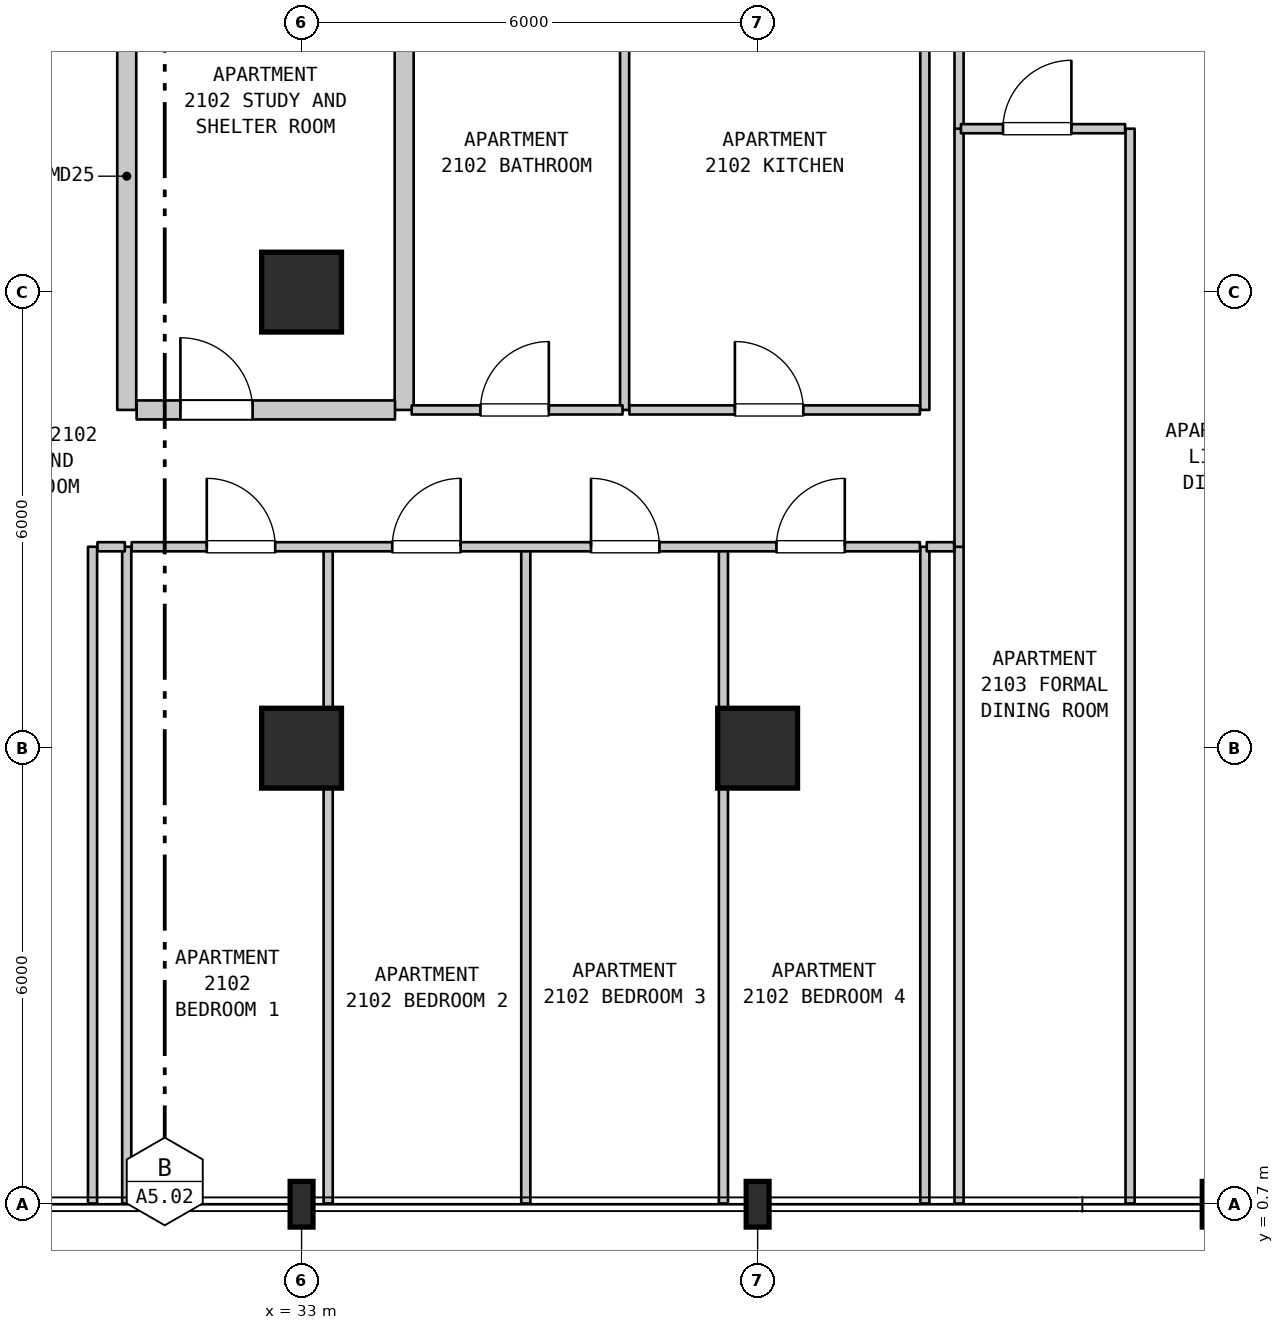
"""IFC4 building model, lengths in metres.
Left out: names, types, materials, properties, quantities, classifications, styles, units other than length and angle.
Written with IfcOpenShell. Run it as: python <this file> out.ifc"""

import sys

from ifc_helpers import new_model, si_unit, direction, frame, frame_2d, origin, origin_2d, place, context, subcontext, project, spatial, rectangle, i_section, extrude, element, fill, save


model = new_model("IFC4")
c1 = context("Model", 3, precision=1e-05, world=origin(), true_north=direction((0.0, 1.0)))
c2 = subcontext(c1, "Body", "Model", "MODEL_VIEW")
j1 = project(units=[si_unit("LENGTHUNIT", "METRE"), si_unit("PLANEANGLEUNIT", "RADIAN")], contexts=[c1])
p1 = place(None, origin())
s1 = spatial("IfcSite", under=j1, at=p1, CompositionType="ELEMENT")
p2 = place(p1, origin())
s2 = spatial("IfcBuilding", under=s1, at=p2, CompositionType="ELEMENT")
p3 = place(p2, frame((0.0, 0.0, 90.9)))
s3 = spatial("IfcBuildingStorey", under=s2, at=p3, CompositionType="ELEMENT", Elevation=90.9)
p4 = place(p3, frame((33.0, 0.7, 0.0), z_axis=(0.0, 0.0, 1.0), x_axis=(1.0, 0.0, 0.0)))
e1 = element("IfcColumn", 1, at=p4, inside=s3, PredefinedType="COLUMN", context=c2, shape_type="SweptSolid", body=[
    extrude(i_section(OverallWidth=0.3, OverallDepth=0.6, WebThickness=0.015, FlangeThickness=0.03, FilletRadius=0.027, at=origin_2d()), origin(), (0.0, 0.0, 1.0), 3.7),
])
for number, where, z_axis, x_axis in (
    (2, (33.0, 6.7, 0.0), (0.0, 0.0, 1.0), (1.0, 0.0, 0.0)),
    (3, (33.0, 12.7, 0.0), (0.0, 0.0, 1.0), (1.0, 0.0, 0.0)),
):
    element("IfcColumn", number, at=place(p3, frame(where, z_axis=z_axis, x_axis=x_axis)), inside=s3, PredefinedType="COLUMN", context=c2, shape_type="SweptSolid", body=[
        extrude(rectangle(XDim=1.05, YDim=1.05, at=origin_2d()), origin(), (0.0, 0.0, 1.0), 3.7),
    ])
p5 = place(p3, frame((39.0, 0.7, 0.0), z_axis=(0.0, 0.0, 1.0), x_axis=(1.0, 0.0, 0.0)))
e4 = element("IfcColumn", 4, at=p5, inside=s3, PredefinedType="COLUMN", context=c2, shape_type="SweptSolid", body=[
    extrude(i_section(OverallWidth=0.3, OverallDepth=0.6, WebThickness=0.015, FlangeThickness=0.03, FilletRadius=0.027, at=origin_2d()), origin(), (0.0, 0.0, 1.0), 3.7),
])
p6 = place(p3, frame((39.0, 6.7, 0.0), z_axis=(0.0, 0.0, 1.0), x_axis=(1.0, 0.0, 0.0)))
e5 = element("IfcColumn", 5, at=p6, inside=s3, PredefinedType="COLUMN", context=c2, shape_type="SweptSolid", body=[
    extrude(rectangle(XDim=1.05, YDim=1.05, at=origin_2d()), origin(), (0.0, 0.0, 1.0), 3.7),
])
p7 = place(p3, frame((45.0, 0.7, 0.0), z_axis=(0.0, 0.0, 1.0), x_axis=(1.0, 0.0, 0.0)))
e6 = element("IfcColumn", 6, at=p7, inside=s3, PredefinedType="COLUMN", context=c2, shape_type="SweptSolid", body=[
    extrude(i_section(OverallWidth=0.3, OverallDepth=0.6, WebThickness=0.015, FlangeThickness=0.03, FilletRadius=0.027, at=origin_2d()), origin(), (0.0, 0.0, 1.0), 3.7),
])
for number, where, z_axis, x_axis in (
    (7, (30.25, 0.71, 0.0), (0.0, 0.0, 1.0), (0.0, 1.0, 0.0)),
    (8, (30.7, 0.71, 0.0), (0.0, 0.0, 1.0), (0.0, 1.0, 0.0)),
):
    element("IfcWall", number, at=place(p3, frame(where, z_axis=z_axis, x_axis=x_axis)), inside=s3, PredefinedType="PARTITIONING", context=c2, shape_type="SweptSolid", body=[
        extrude(rectangle(XDim=8.64, YDim=0.12, at=frame_2d((4.32, 0.0))), origin(), (0.0, 0.0, 1.0), 3.385),
    ])
p8 = place(p3, frame((30.7, 11.15, 0.0), z_axis=(0.0, 0.0, 1.0), x_axis=(0.0, 1.0, 0.0)))
e9 = element("IfcWall", 9, at=p8, inside=s3, PredefinedType="STANDARD", context=c2, shape_type="SweptSolid", body=[
    extrude(rectangle(XDim=6.15, YDim=0.25, at=frame_2d((3.075, 0.0))), origin(), (0.0, 0.0, 1.0), 3.385),
])
p9 = place(p3, frame((33.35, 0.71, 0.0), z_axis=(0.0, 0.0, 1.0), x_axis=(0.0, 1.0, 0.0)))
e10 = element("IfcWall", 10, at=p9, inside=s3, PredefinedType="PARTITIONING", context=c2, shape_type="SweptSolid", body=[
    extrude(rectangle(XDim=8.64, YDim=0.12, at=frame_2d((4.32, 0.0))), origin(), (0.0, 0.0, 1.0), 3.385),
])
p10 = place(p3, frame((34.35, 11.15, 0.0), z_axis=(0.0, 0.0, 1.0), x_axis=(0.0, 1.0, 0.0)))
e11 = element("IfcWall", 11, at=p10, inside=s3, PredefinedType="STANDARD", context=c2, shape_type="SweptSolid", body=[
    extrude(rectangle(XDim=6.15, YDim=0.25, at=frame_2d((3.075, 0.0))), origin(), (0.0, 0.0, 1.0), 3.385),
])
p11 = place(p3, frame((35.95, 0.71, 0.0), z_axis=(0.0, 0.0, 1.0), x_axis=(0.0, 1.0, 0.0)))
e12 = element("IfcWall", 12, at=p11, inside=s3, PredefinedType="PARTITIONING", context=c2, shape_type="SweptSolid", body=[
    extrude(rectangle(XDim=8.64, YDim=0.12, at=frame_2d((4.32, 0.0))), origin(), (0.0, 0.0, 1.0), 3.385),
])
p12 = place(p3, frame((37.25, 11.15, 0.0), z_axis=(0.0, 0.0, 1.0), x_axis=(0.0, 1.0, 0.0)))
e13 = element("IfcWall", 13, at=p12, inside=s3, PredefinedType="PARTITIONING", context=c2, shape_type="SweptSolid", body=[
    extrude(rectangle(XDim=6.15, YDim=0.12, at=frame_2d((3.075, 0.0))), origin(), (0.0, 0.0, 1.0), 3.385),
])
for number, where, z_axis, x_axis in (
    (14, (38.55, 0.71, 0.0), (0.0, 0.0, 1.0), (0.0, 1.0, 0.0)),
    (15, (41.2, 0.71, 0.0), (0.0, 0.0, 1.0), (0.0, 1.0, 0.0)),
):
    element("IfcWall", number, at=place(p3, frame(where, z_axis=z_axis, x_axis=x_axis)), inside=s3, PredefinedType="PARTITIONING", context=c2, shape_type="SweptSolid", body=[
        extrude(rectangle(XDim=8.64, YDim=0.12, at=frame_2d((4.32, 0.0))), origin(), (0.0, 0.0, 1.0), 3.385),
    ])
p13 = place(p3, frame((41.2, 11.15, 0.0), z_axis=(0.0, 0.0, 1.0), x_axis=(0.0, 1.0, 0.0)))
e16 = element("IfcWall", 16, at=p13, inside=s3, PredefinedType="PARTITIONING", context=c2, shape_type="SweptSolid", body=[
    extrude(rectangle(XDim=6.15, YDim=0.12, at=frame_2d((3.075, 0.0))), origin(), (0.0, 0.0, 1.0), 3.385),
])
p14 = place(p3, frame((41.65, 0.71, 0.0), z_axis=(0.0, 0.0, 1.0), x_axis=(0.0, 1.0, 0.0)))
e17 = element("IfcWall", 17, at=p14, inside=s3, PredefinedType="PARTITIONING", context=c2, shape_type="SweptSolid", body=[
    extrude(rectangle(XDim=8.64, YDim=0.12, at=frame_2d((4.32, 0.0))), origin(), (0.0, 0.0, 1.0), 3.385),
])
p15 = place(p3, frame((41.65, 9.35, 0.0), z_axis=(0.0, 0.0, 1.0), x_axis=(0.0, 1.0, 0.0)))
e18 = element("IfcWall", 18, at=p15, inside=s3, PredefinedType="PARTITIONING", context=c2, shape_type="SweptSolid", body=[
    extrude(rectangle(XDim=5.5, YDim=0.12, at=frame_2d((2.75, 0.0))), origin(), (0.0, 0.0, 1.0), 3.385),
])
p16 = place(p3, frame((41.65, 14.85, 0.0), z_axis=(0.0, 0.0, 1.0), x_axis=(0.0, 1.0, 0.0)))
e19 = element("IfcWall", 19, at=p16, inside=s3, PredefinedType="PARTITIONING", context=c2, shape_type="SweptSolid", body=[
    extrude(rectangle(XDim=2.45, YDim=0.12, at=frame_2d((1.225, 0.0))), origin(), (0.0, 0.0, 1.0), 3.385),
])
p17 = place(p3, frame((43.9, 0.71, 0.0), z_axis=(0.0, 0.0, 1.0), x_axis=(0.0, 1.0, 0.0)))
e20 = element("IfcWall", 20, at=p17, inside=s3, PredefinedType="PARTITIONING", context=c2, shape_type="SweptSolid", body=[
    extrude(rectangle(XDim=14.14, YDim=0.12, at=frame_2d((7.07, 0.0))), origin(), (0.0, 0.0, 1.0), 3.385),
])
p18 = place(p3, frame((30.315, 9.35, 0.0), z_axis=(0.0, 0.0, 1.0), x_axis=(1.0, 0.0, 0.0)))
e21 = element("IfcWall", 21, at=p18, inside=s3, PredefinedType="PARTITIONING", context=c2, shape_type="SweptSolid", body=[
    extrude(rectangle(XDim=0.36, YDim=0.12, at=frame_2d((0.18, 0.0))), origin(), (0.0, 0.0, 1.0), 3.385),
])
p19 = place(p3, frame((30.765, 9.35, 0.0), z_axis=(0.0, 0.0, 1.0), x_axis=(1.0, 0.0, 0.0)))
e22 = element("IfcWall", 22, at=p19, inside=s3, PredefinedType="PARTITIONING", context=c2, shape_type="SweptSolid", body=[
    extrude(rectangle(XDim=10.37, YDim=0.12, at=frame_2d((5.185, 0.0))), origin(), (0.0, 0.0, 1.0), 3.385),
])
p20 = place(p19, frame((0.988, 0.0, 0.0)))
e23 = element("IfcOpeningElement", 23, at=p20, cuts=e22, PredefinedType="OPENING", context=c2, shape_type="SweptSolid", body=[
    extrude(rectangle(XDim=0.9, YDim=2.15, at=frame_2d((0.45, 1.075))), frame((0.0, 0.07, 0.0), z_axis=(0.0, -1.0, 0.0), x_axis=(1.0, 0.0, 0.0)), (0.0, 0.0, 1.0), 0.14),
])
p21 = place(p19, frame((3.428, 0.0, 0.0)))
e24 = element("IfcOpeningElement", 24, at=p21, cuts=e22, PredefinedType="OPENING", context=c2, shape_type="SweptSolid", body=[
    extrude(rectangle(XDim=0.9, YDim=2.15, at=frame_2d((0.45, 1.075))), frame((0.0, 0.07, 0.0), z_axis=(0.0, -1.0, 0.0), x_axis=(1.0, 0.0, 0.0)), (0.0, 0.0, 1.0), 0.14),
])
p22 = place(p19, frame((6.043, 0.0, 0.0)))
e25 = element("IfcOpeningElement", 25, at=p22, cuts=e22, PredefinedType="OPENING", context=c2, shape_type="SweptSolid", body=[
    extrude(rectangle(XDim=0.9, YDim=2.15, at=frame_2d((0.45, 1.075))), frame((0.0, 0.07, 0.0), z_axis=(0.0, -1.0, 0.0), x_axis=(1.0, 0.0, 0.0)), (0.0, 0.0, 1.0), 0.14),
])
p23 = place(p19, frame((8.482, 0.0, 0.0)))
e26 = element("IfcOpeningElement", 26, at=p23, cuts=e22, PredefinedType="OPENING", context=c2, shape_type="SweptSolid", body=[
    extrude(rectangle(XDim=0.9, YDim=2.15, at=frame_2d((0.45, 1.075))), frame((0.0, 0.07, 0.0), z_axis=(0.0, -1.0, 0.0), x_axis=(1.0, 0.0, 0.0)), (0.0, 0.0, 1.0), 0.14),
])
p24 = place(p3, frame((41.225, 9.35, 0.0), z_axis=(0.0, 0.0, 1.0), x_axis=(1.0, 0.0, 0.0)))
e27 = element("IfcWall", 27, at=p24, inside=s3, PredefinedType="PARTITIONING", context=c2, shape_type="SweptSolid", body=[
    extrude(rectangle(XDim=0.36, YDim=0.12, at=frame_2d((0.18, 0.0))), origin(), (0.0, 0.0, 1.0), 3.385),
])
p25 = place(p3, frame((30.83, 11.15, 0.0), z_axis=(0.0, 0.0, 1.0), x_axis=(1.0, 0.0, 0.0)))
e28 = element("IfcWall", 28, at=p25, inside=s3, PredefinedType="STANDARD", context=c2, shape_type="SweptSolid", body=[
    extrude(rectangle(XDim=3.399, YDim=0.25, at=frame_2d((1.699, 0.0))), origin(), (0.0, 0.0, 1.0), 3.385),
])
p26 = place(p25, frame((0.576, 0.0, 0.0)))
e29 = element("IfcOpeningElement", 29, at=p26, cuts=e28, PredefinedType="OPENING", context=c2, shape_type="SweptSolid", body=[
    extrude(rectangle(XDim=0.95, YDim=2.15, at=frame_2d((0.475, 1.075))), frame((0.0, 0.135, 0.0), z_axis=(0.0, -1.0, 0.0), x_axis=(1.0, 0.0, 0.0)), (0.0, 0.0, 1.0), 0.27),
])
p27 = place(p3, frame((34.449, 11.15, 0.0), z_axis=(0.0, 0.0, 1.0), x_axis=(1.0, 0.0, 0.0)))
e30 = element("IfcWall", 30, at=p27, inside=s3, PredefinedType="PARTITIONING", context=c2, shape_type="SweptSolid", body=[
    extrude(rectangle(XDim=2.774, YDim=0.12, at=frame_2d((1.387, 0.0))), origin(), (0.0, 0.0, 1.0), 3.385),
])
p28 = place(p27, frame((0.904, 0.0, 0.0)))
e31 = element("IfcOpeningElement", 31, at=p28, cuts=e30, PredefinedType="OPENING", context=c2, shape_type="SweptSolid", body=[
    extrude(rectangle(XDim=0.9, YDim=2.1, at=frame_2d((0.45, 1.05))), frame((0.0, 0.07, 0.0), z_axis=(0.0, -1.0, 0.0), x_axis=(1.0, 0.0, 0.0)), (0.0, 0.0, 1.0), 0.14),
])
p29 = place(p3, frame((37.313, 11.15, 0.0), z_axis=(0.0, 0.0, 1.0), x_axis=(1.0, 0.0, 0.0)))
e32 = element("IfcWall", 32, at=p29, inside=s3, PredefinedType="PARTITIONING", context=c2, shape_type="SweptSolid", body=[
    extrude(rectangle(XDim=3.822, YDim=0.12, at=frame_2d((1.911, 0.0))), origin(), (0.0, 0.0, 1.0), 3.385),
])
p30 = place(p29, frame((1.388, 0.0, 0.0)))
e33 = element("IfcOpeningElement", 33, at=p30, cuts=e32, PredefinedType="OPENING", context=c2, shape_type="SweptSolid", body=[
    extrude(rectangle(XDim=0.9, YDim=2.15, at=frame_2d((0.45, 1.075))), frame((0.0, 0.07, 0.0), z_axis=(0.0, -1.0, 0.0), x_axis=(1.0, 0.0, 0.0)), (0.0, 0.0, 1.0), 0.14),
])
p31 = place(p3, frame((41.675, 14.85, 0.0), z_axis=(0.0, 0.0, 1.0), x_axis=(1.0, 0.0, 0.0)))
e34 = element("IfcWall", 34, at=p31, inside=s3, PredefinedType="PARTITIONING", context=c2, shape_type="SweptSolid", body=[
    extrude(rectangle(XDim=2.16, YDim=0.12, at=frame_2d((1.08, 0.0))), origin(), (0.0, 0.0, 1.0), 3.385),
])
p32 = place(p31, frame((0.553, 0.0, 0.0)))
e35 = element("IfcOpeningElement", 35, at=p32, cuts=e34, PredefinedType="OPENING", context=c2, shape_type="SweptSolid", body=[
    extrude(rectangle(XDim=0.9, YDim=2.15, at=frame_2d((0.45, 1.075))), frame((0.0, 0.07, 0.0), z_axis=(0.0, -1.0, 0.0), x_axis=(1.0, 0.0, 0.0)), (0.0, 0.0, 1.0), 0.14),
])
p33 = place(p20, origin())
e36 = element("IfcDoor", 36, at=p33, inside=s3, OperationType="SINGLE_SWING_LEFT", PredefinedType="DOOR", context=c2, shape_type="SweptSolid", body=[
    extrude(rectangle(XDim=0.9, YDim=2.15, at=frame_2d((0.45, 1.075))), frame((0.0, 0.025, 0.0), z_axis=(0.0, -1.0, 0.0), x_axis=(1.0, 0.0, 0.0)), (0.0, 0.0, 1.0), 0.05),
])
fill(e23, e36)
p34 = place(p21, origin())
e37 = element("IfcDoor", 37, at=p34, inside=s3, OperationType="SINGLE_SWING_RIGHT", PredefinedType="DOOR", context=c2, shape_type="SweptSolid", body=[
    extrude(rectangle(XDim=0.9, YDim=2.15, at=frame_2d((0.45, 1.075))), frame((0.0, 0.025, 0.0), z_axis=(0.0, -1.0, 0.0), x_axis=(1.0, 0.0, 0.0)), (0.0, 0.0, 1.0), 0.05),
])
fill(e24, e37)
p35 = place(p22, origin())
e38 = element("IfcDoor", 38, at=p35, inside=s3, OperationType="SINGLE_SWING_LEFT", PredefinedType="DOOR", context=c2, shape_type="SweptSolid", body=[
    extrude(rectangle(XDim=0.9, YDim=2.15, at=frame_2d((0.45, 1.075))), frame((0.0, 0.025, 0.0), z_axis=(0.0, -1.0, 0.0), x_axis=(1.0, 0.0, 0.0)), (0.0, 0.0, 1.0), 0.05),
])
fill(e25, e38)
p36 = place(p23, origin())
e39 = element("IfcDoor", 39, at=p36, inside=s3, OperationType="SINGLE_SWING_RIGHT", PredefinedType="DOOR", context=c2, shape_type="SweptSolid", body=[
    extrude(rectangle(XDim=0.9, YDim=2.15, at=frame_2d((0.45, 1.075))), frame((0.0, 0.025, 0.0), z_axis=(0.0, -1.0, 0.0), x_axis=(1.0, 0.0, 0.0)), (0.0, 0.0, 1.0), 0.05),
])
fill(e26, e39)
p37 = place(p26, origin())
e40 = element("IfcDoor", 40, at=p37, inside=s3, OperationType="SINGLE_SWING_LEFT", PredefinedType="DOOR", context=c2, shape_type="SweptSolid", body=[
    extrude(rectangle(XDim=0.95, YDim=2.15, at=frame_2d((0.475, 1.075))), frame((0.0, 0.025, 0.0), z_axis=(0.0, -1.0, 0.0), x_axis=(1.0, 0.0, 0.0)), (0.0, 0.0, 1.0), 0.05),
])
fill(e29, e40)
p38 = place(p28, origin())
e41 = element("IfcDoor", 41, at=p38, inside=s3, OperationType="SINGLE_SWING_RIGHT", PredefinedType="DOOR", context=c2, shape_type="SweptSolid", body=[
    extrude(rectangle(XDim=0.9, YDim=2.1, at=frame_2d((0.45, 1.05))), frame((0.0, 0.025, 0.0), z_axis=(0.0, -1.0, 0.0), x_axis=(1.0, 0.0, 0.0)), (0.0, 0.0, 1.0), 0.05),
])
fill(e31, e41)
p39 = place(p30, origin())
e42 = element("IfcDoor", 42, at=p39, inside=s3, OperationType="SINGLE_SWING_LEFT", PredefinedType="DOOR", context=c2, shape_type="SweptSolid", body=[
    extrude(rectangle(XDim=0.9, YDim=2.15, at=frame_2d((0.45, 1.075))), frame((0.0, 0.025, 0.0), z_axis=(0.0, -1.0, 0.0), x_axis=(1.0, 0.0, 0.0)), (0.0, 0.0, 1.0), 0.05),
])
fill(e33, e42)
p40 = place(p32, origin())
e43 = element("IfcDoor", 43, at=p40, inside=s3, OperationType="SINGLE_SWING_RIGHT", PredefinedType="DOOR", context=c2, shape_type="SweptSolid", body=[
    extrude(rectangle(XDim=0.9, YDim=2.15, at=frame_2d((0.45, 1.075))), frame((0.0, 0.025, 0.0), z_axis=(0.0, -1.0, 0.0), x_axis=(1.0, 0.0, 0.0)), (0.0, 0.0, 1.0), 0.05),
])
fill(e35, e43)
save(model, sys.argv[1])
